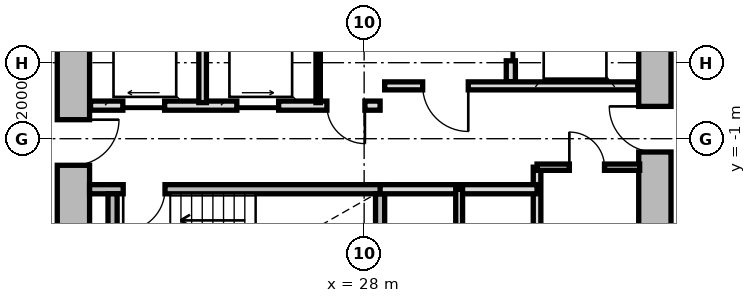
"""IFC4 building model, lengths in metres.
Left out: names, types, materials, properties, quantities, classifications, styles, units other than length and angle.
Written with IfcOpenShell. Run it as: python <this file> out.ifc"""

import sys

from ifc_helpers import new_model, si_unit, direction, frame, frame_2d, origin, place, context, subcontext, project, spatial, rectangle, extrude, source, transform, mapped, element, fill, save


model = new_model("IFC4")
c1 = context("Model", 3, precision=1e-05, world=origin(), true_north=direction((0.0, 1.0)))
c2 = subcontext(c1, "Body", "Model", "MODEL_VIEW")
j1 = project(units=[si_unit("LENGTHUNIT", "METRE"), si_unit("PLANEANGLEUNIT", "RADIAN")], contexts=[c1])
p1 = place(None, origin())
s1 = spatial("IfcSite", under=j1, at=p1, CompositionType="ELEMENT")
p2 = place(p1, origin())
s2 = spatial("IfcBuilding", under=s1, at=p2, CompositionType="ELEMENT")
p3 = place(p2, frame((0.0, 0.0, 64.3)))
s3 = spatial("IfcBuildingStorey", under=s2, at=p3, CompositionType="ELEMENT", Elevation=64.3)
m1 = source(origin(), c2, "Body", "SweptSolid", [
    extrude(rectangle(XDim=11.0, YDim=0.85, at=frame_2d((5.5, 0.0))), origin(), (0.0, 0.0, 1.0), 2.79),
])
p4 = place(p3, frame((20.35, -5.5, 0.0), z_axis=(0.0, 0.0, 1.0), x_axis=(0.0, 1.0, 0.0)))
e1 = element("IfcWall", 1, at=p4, inside=s3, PredefinedType="SHEAR", context=c2, shape_type="MappedRepresentation", body=[
    mapped(m1, transform((0.0, 0.0, 0.0), x_axis=(1.0, 0.0, 0.0), y_axis=(0.0, 1.0, 0.0), z_axis=(0.0, 0.0, 1.0), scale=1.0)),
])
p5 = place(p4, frame((3.8, 0.0, 0.0)))
e2 = element("IfcOpeningElement", 2, at=p5, cuts=e1, PredefinedType="OPENING", context=c2, shape_type="SweptSolid", body=[
    extrude(rectangle(XDim=1.2, YDim=2.15, at=frame_2d((0.6, 1.075))), frame((0.0, 0.435, 0.0), z_axis=(0.0, -1.0, 0.0), x_axis=(1.0, 0.0, 0.0)), (0.0, 0.0, 1.0), 0.87),
])
p6 = place(p3, frame((35.65, 5.5, 0.0), z_axis=(0.0, 0.0, 1.0), x_axis=(0.0, -1.0, 0.0)))
e3 = element("IfcWall", 3, at=p6, inside=s3, PredefinedType="SHEAR", context=c2, shape_type="MappedRepresentation", body=[
    mapped(m1, transform((0.0, 0.0, 0.0), x_axis=(1.0, 0.0, 0.0), y_axis=(0.0, 1.0, 0.0), z_axis=(0.0, 0.0, 1.0), scale=1.0)),
])
p7 = place(p6, frame((5.65, 0.0, 0.0)))
e4 = element("IfcOpeningElement", 4, at=p7, cuts=e3, PredefinedType="OPENING", context=c2, shape_type="SweptSolid", body=[
    extrude(rectangle(XDim=1.2, YDim=2.15, at=frame_2d((0.6, 1.075))), frame((0.0, 0.435, 0.0), z_axis=(0.0, -1.0, 0.0), x_axis=(1.0, 0.0, 0.0)), (0.0, 0.0, 1.0), 0.87),
])
m2 = source(origin(), c2, "Body", "SweptSolid", [
    extrude(rectangle(XDim=7.765, YDim=0.24, at=frame_2d((3.883, 0.0))), origin(), (0.0, 0.0, 1.0), 2.79),
])
p8 = place(p3, frame((20.775, -2.33, 0.0), z_axis=(0.0, 0.0, 1.0), x_axis=(1.0, 0.0, 0.0)))
e5 = element("IfcWall", 5, at=p8, inside=s3, PredefinedType="PARTITIONING", context=c2, shape_type="MappedRepresentation", body=[
    mapped(m2, transform((0.0, 0.0, 0.0), x_axis=(1.0, 0.0, 0.0), y_axis=(0.0, 1.0, 0.0), z_axis=(0.0, 0.0, 1.0), scale=1.0)),
])
p9 = place(p8, frame((0.885, 0.0, 0.0)))
e6 = element("IfcOpeningElement", 6, at=p9, cuts=e5, PredefinedType="OPENING", context=c2, shape_type="SweptSolid", body=[
    extrude(rectangle(XDim=1.1, YDim=2.15, at=frame_2d((0.55, 1.075))), frame((0.0, 0.13, 0.0), z_axis=(0.0, -1.0, 0.0), x_axis=(1.0, 0.0, 0.0)), (0.0, 0.0, 1.0), 0.26),
])
m3 = source(origin(), c2, "Body", "SweptSolid", [
    extrude(rectangle(XDim=3.075, YDim=0.24, at=frame_2d((1.538, 0.0))), origin(), (0.0, 0.0, 1.0), 2.79),
])
for number, where, z_axis, x_axis in (
    (7, (21.38, -5.525, 0.0), (0.0, 0.0, 1.0), (0.0, 1.0, 0.0)),
    (8, (28.42, -5.525, 0.0), (0.0, 0.0, 1.0), (0.0, 1.0, 0.0)),
):
    element("IfcWall", number, at=place(p3, frame(where, z_axis=z_axis, x_axis=x_axis)), inside=s3, PredefinedType="PARTITIONING", context=c2, shape_type="MappedRepresentation", body=[
        mapped(m3, transform((0.0, 0.0, 0.0), x_axis=(1.0, 0.0, 0.0), y_axis=(0.0, 1.0, 0.0), z_axis=(0.0, 0.0, 1.0), scale=1.0)),
    ])
m4 = source(origin(), c2, "Body", "SweptSolid", [
    extrude(rectangle(XDim=5.0, YDim=0.24, at=frame_2d((2.5, 0.0))), origin(), (0.0, 0.0, 1.0), 2.775),
])
p10 = place(p3, frame((31.86, 0.5, 0.0), z_axis=(0.0, 0.0, 1.0), x_axis=(0.0, 1.0, 0.0)))
e9 = element("IfcWall", 9, at=p10, inside=s3, PredefinedType="PARTITIONING", context=c2, shape_type="MappedRepresentation", body=[
    mapped(m4, transform((0.0, 0.0, 0.0), x_axis=(1.0, 0.0, 0.0), y_axis=(0.0, 1.0, 0.0), z_axis=(0.0, 0.0, 1.0), scale=1.0)),
])
p11 = place(p10, frame((3.05, 0.0, 0.0)))
e10 = element("IfcOpeningElement", 10, at=p11, cuts=e9, PredefinedType="OPENING", context=c2, shape_type="SweptSolid", body=[
    extrude(rectangle(XDim=1.3, YDim=2.2, at=frame_2d((0.65, 1.1))), frame((0.0, 0.13, 0.0), z_axis=(0.0, -1.0, 0.0), x_axis=(1.0, 0.0, 0.0)), (0.0, 0.0, 1.0), 0.26),
])
p12 = place(p10, frame((0.55, 0.0, 0.0)))
e11 = element("IfcOpeningElement", 11, at=p12, cuts=e9, PredefinedType="OPENING", context=c2, shape_type="SweptSolid", body=[
    extrude(rectangle(XDim=1.3, YDim=2.2, at=frame_2d((0.65, 1.1))), frame((0.0, 0.13, 0.0), z_axis=(0.0, -1.0, 0.0), x_axis=(1.0, 0.0, 0.0)), (0.0, 0.0, 1.0), 0.26),
])
m5 = source(origin(), c2, "Body", "SweptSolid", [
    extrude(rectangle(XDim=6.66, YDim=0.21, at=frame_2d((3.33, 0.0))), origin(), (0.0, 0.0, 1.0), 2.775),
])
p13 = place(p3, frame((28.54, 0.39, 0.0), z_axis=(0.0, 0.0, 1.0), x_axis=(1.0, 0.0, 0.0)))
e12 = element("IfcWall", 12, at=p13, inside=s3, PredefinedType="PARTITIONING", context=c2, shape_type="MappedRepresentation", body=[
    mapped(m5, transform((0.0, 0.0, 0.0), x_axis=(1.0, 0.0, 0.0), y_axis=(0.0, 1.0, 0.0), z_axis=(0.0, 0.0, 1.0), scale=1.0)),
])
p14 = place(p13, frame((1.0, 0.0, 0.0)))
e13 = element("IfcOpeningElement", 13, at=p14, cuts=e12, PredefinedType="OPENING", context=c2, shape_type="SweptSolid", body=[
    extrude(rectangle(XDim=1.2, YDim=2.15, at=frame_2d((0.6, 1.075))), frame((0.0, 0.115, 0.0), z_axis=(0.0, -1.0, 0.0), x_axis=(1.0, 0.0, 0.0)), (0.0, 0.0, 1.0), 0.23),
])
m6 = source(origin(), c2, "Body", "SweptSolid", [
    extrude(rectangle(XDim=7.62, YDim=0.24, at=frame_2d((3.81, 0.0))), origin(), (0.0, 0.0, 1.0), 2.775),
])
p15 = place(p3, frame((20.8, -0.13, 0.0), z_axis=(0.0, 0.0, 1.0), x_axis=(1.0, 0.0, 0.0)))
e14 = element("IfcWall", 14, at=p15, inside=s3, PredefinedType="PARTITIONING", context=c2, shape_type="MappedRepresentation", body=[
    mapped(m6, transform((0.0, 0.0, 0.0), x_axis=(1.0, 0.0, 0.0), y_axis=(0.0, 1.0, 0.0), z_axis=(0.0, 0.0, 1.0), scale=1.0)),
])
p16 = place(p15, frame((6.22, 0.0, 0.0)))
e15 = element("IfcOpeningElement", 15, at=p16, cuts=e14, PredefinedType="OPENING", context=c2, shape_type="SweptSolid", body=[
    extrude(rectangle(XDim=1.0, YDim=2.1, at=frame_2d((0.5, 1.05))), frame((0.0, 0.13, 0.0), z_axis=(0.0, -1.0, 0.0), x_axis=(1.0, 0.0, 0.0)), (0.0, 0.0, 1.0), 0.26),
])
p17 = place(p15, frame((0.85, 0.0, 0.0)))
e16 = element("IfcOpeningElement", 16, at=p17, cuts=e14, PredefinedType="OPENING", context=c2, shape_type="SweptSolid", body=[
    extrude(rectangle(XDim=1.1, YDim=2.2, at=frame_2d((0.55, 1.1))), frame((0.0, 0.13, 0.0), z_axis=(0.0, -1.0, 0.0), x_axis=(1.0, 0.0, 0.0)), (0.0, 0.0, 1.0), 0.26),
])
p18 = place(p15, frame((3.85, 0.0, 0.0)))
e17 = element("IfcOpeningElement", 17, at=p18, cuts=e14, PredefinedType="OPENING", context=c2, shape_type="SweptSolid", body=[
    extrude(rectangle(XDim=1.1, YDim=2.2, at=frame_2d((0.55, 1.1))), frame((0.0, 0.13, 0.0), z_axis=(0.0, -1.0, 0.0), x_axis=(1.0, 0.0, 0.0)), (0.0, 0.0, 1.0), 0.26),
])
m7 = source(origin(), c2, "Body", "SweptSolid", [
    extrude(rectangle(XDim=2.33, YDim=0.115, at=frame_2d((1.165, 0.0))), origin(), (0.0, 0.0, 1.0), 2.775),
])
p19 = place(p3, frame((26.79, -0.05, 0.0), z_axis=(0.0, 0.0, 1.0), x_axis=(0.0, 1.0, 0.0)))
e18 = element("IfcWall", 18, at=p19, inside=s3, PredefinedType="PARTITIONING", context=c2, shape_type="MappedRepresentation", body=[
    mapped(m7, transform((0.0, 0.0, 0.0), x_axis=(1.0, 0.0, 0.0), y_axis=(0.0, 1.0, 0.0), z_axis=(0.0, 0.0, 1.0), scale=1.0)),
])
m8 = source(origin(), c2, "Body", "SweptSolid", [
    extrude(rectangle(XDim=2.33, YDim=0.2, at=frame_2d((1.165, 0.0))), origin(), (0.0, 0.0, 1.0), 2.775),
])
p20 = place(p3, frame((23.75, -0.05, 0.0), z_axis=(0.0, 0.0, 1.0), x_axis=(0.0, 1.0, 0.0)))
e19 = element("IfcWall", 19, at=p20, inside=s3, PredefinedType="PARTITIONING", context=c2, shape_type="MappedRepresentation", body=[
    mapped(m8, transform((0.0, 0.0, 0.0), x_axis=(1.0, 0.0, 0.0), y_axis=(0.0, 1.0, 0.0), z_axis=(0.0, 0.0, 1.0), scale=1.0)),
])
m9 = source(origin(), c2, "Body", "SweptSolid", [
    extrude(rectangle(XDim=3.8, YDim=0.2, at=frame_2d((1.9, 0.0))), origin(), (0.0, 0.0, 1.0), 2.775),
])
p21 = place(p3, frame((32.55, -5.55, 0.0), z_axis=(0.0, 0.0, 1.0), x_axis=(0.0, 1.0, 0.0)))
e20 = element("IfcWall", 20, at=p21, inside=s3, PredefinedType="PARTITIONING", context=c2, shape_type="MappedRepresentation", body=[
    mapped(m9, transform((0.0, 0.0, 0.0), x_axis=(1.0, 0.0, 0.0), y_axis=(0.0, 1.0, 0.0), z_axis=(0.0, 0.0, 1.0), scale=1.0)),
])
m10 = source(origin(), c2, "Body", "SweptSolid", [
    extrude(rectangle(XDim=4.13, YDim=0.24, at=frame_2d((2.065, 0.0))), origin(), (0.0, 0.0, 1.0), 2.775),
])
p22 = place(p3, frame((28.42, -2.33, 0.0), z_axis=(0.0, 0.0, 1.0), x_axis=(1.0, 0.0, 0.0)))
e21 = element("IfcWall", 21, at=p22, inside=s3, PredefinedType="PARTITIONING", context=c2, shape_type="MappedRepresentation", body=[
    mapped(m10, transform((0.0, 0.0, 0.0), x_axis=(1.0, 0.0, 0.0), y_axis=(0.0, 1.0, 0.0), z_axis=(0.0, 0.0, 1.0), scale=1.0)),
])
m11 = source(origin(), c2, "Body", "SweptSolid", [
    extrude(rectangle(XDim=3.22, YDim=0.18, at=frame_2d((1.61, 0.0))), origin(), (0.0, 0.0, 1.0), 2.775),
])
p23 = place(p3, frame((30.5, -5.55, 0.0), z_axis=(0.0, 0.0, 1.0), x_axis=(0.0, 1.0, 0.0)))
e22 = element("IfcWall", 22, at=p23, inside=s3, PredefinedType="PARTITIONING", context=c2, shape_type="MappedRepresentation", body=[
    mapped(m11, transform((0.0, 0.0, 0.0), x_axis=(1.0, 0.0, 0.0), y_axis=(0.0, 1.0, 0.0), z_axis=(0.0, 0.0, 1.0), scale=1.0)),
])
m12 = source(origin(), c2, "Body", "SweptSolid", [
    extrude(rectangle(XDim=2.7, YDim=0.165, at=frame_2d((1.35, 0.0))), origin(), (0.0, 0.0, 1.0), 2.775),
])
p24 = place(p3, frame((32.55, -1.75, 0.0), z_axis=(0.0, 0.0, 1.0), x_axis=(1.0, 0.0, 0.0)))
e23 = element("IfcWall", 23, at=p24, inside=s3, PredefinedType="PARTITIONING", context=c2, shape_type="MappedRepresentation", body=[
    mapped(m12, transform((0.0, 0.0, 0.0), x_axis=(1.0, 0.0, 0.0), y_axis=(0.0, 1.0, 0.0), z_axis=(0.0, 0.0, 1.0), scale=1.0)),
])
p25 = place(p24, frame((0.85, 0.0, 0.0)))
e24 = element("IfcOpeningElement", 24, at=p25, cuts=e23, PredefinedType="OPENING", context=c2, shape_type="SweptSolid", body=[
    extrude(rectangle(XDim=0.925, YDim=2.1, at=frame_2d((0.462, 1.05))), frame((0.0, 0.093, 0.0), z_axis=(0.0, -1.0, 0.0), x_axis=(1.0, 0.0, 0.0)), (0.0, 0.0, 1.0), 0.185),
])
m13 = source(origin(), c2, "Body", "SweptSolid", [
    extrude(rectangle(XDim=1.1, YDim=2.15, at=frame_2d((0.55, 1.075))), frame((0.0, 0.025, 0.0), z_axis=(0.0, -1.0, 0.0), x_axis=(1.0, 0.0, 0.0)), (0.0, 0.0, 1.0), 0.05),
])
p26 = place(p9, frame((1.1, 0.0, 0.0), z_axis=(0.0, 0.0, 1.0), x_axis=(-1.0, 0.0, 0.0)))
e25 = element("IfcDoor", 25, at=p26, inside=s3, OperationType="SINGLE_SWING_RIGHT", PredefinedType="DOOR", context=c2, shape_type="MappedRepresentation", body=[
    mapped(m13, transform((0.0, 0.0, 0.0), x_axis=(1.0, 0.0, 0.0), y_axis=(0.0, 1.0, 0.0), z_axis=(0.0, 0.0, 1.0), scale=1.0)),
])
fill(e6, e25)
m14 = source(origin(), c2, "Body", "SweptSolid", [
    extrude(rectangle(XDim=1.3, YDim=2.2, at=frame_2d((0.65, 1.1))), frame((0.0, 0.025, 0.0), z_axis=(0.0, -1.0, 0.0), x_axis=(1.0, 0.0, 0.0)), (0.0, 0.0, 1.0), 0.05),
])
p27 = place(p12, origin())
e26 = element("IfcDoor", 26, at=p27, inside=s3, OperationType="SLIDING_TO_RIGHT", PredefinedType="DOOR", context=c2, shape_type="MappedRepresentation", body=[
    mapped(m14, transform((0.0, 0.0, 0.0), x_axis=(1.0, 0.0, 0.0), y_axis=(0.0, 1.0, 0.0), z_axis=(0.0, 0.0, 1.0), scale=1.0)),
])
fill(e11, e26)
m15 = source(origin(), c2, "Body", "SweptSolid", [
    extrude(rectangle(XDim=1.2, YDim=2.15, at=frame_2d((0.6, 1.075))), frame((0.0, 0.025, 0.0), z_axis=(0.0, -1.0, 0.0), x_axis=(1.0, 0.0, 0.0)), (0.0, 0.0, 1.0), 0.05),
])
p28 = place(p14, frame((1.2, 0.0, 0.0), z_axis=(0.0, 0.0, 1.0), x_axis=(-1.0, 0.0, 0.0)))
e27 = element("IfcDoor", 27, at=p28, inside=s3, OperationType="SINGLE_SWING_LEFT", PredefinedType="DOOR", context=c2, shape_type="MappedRepresentation", body=[
    mapped(m15, transform((0.0, 0.0, 0.0), x_axis=(1.0, 0.0, 0.0), y_axis=(0.0, 1.0, 0.0), z_axis=(0.0, 0.0, 1.0), scale=1.0)),
])
fill(e13, e27)
p29 = place(p5, frame((1.2, 0.0, 0.0), z_axis=(0.0, 0.0, 1.0), x_axis=(-1.0, 0.0, 0.0)))
e28 = element("IfcDoor", 28, at=p29, inside=s3, OperationType="SINGLE_SWING_LEFT", PredefinedType="DOOR", context=c2, shape_type="MappedRepresentation", body=[
    mapped(m15, transform((0.0, 0.0, 0.0), x_axis=(1.0, 0.0, 0.0), y_axis=(0.0, 1.0, 0.0), z_axis=(0.0, 0.0, 1.0), scale=1.0)),
])
fill(e2, e28)
p30 = place(p7, frame((1.2, 0.0, 0.0), z_axis=(0.0, 0.0, 1.0), x_axis=(-1.0, 0.0, 0.0)))
e29 = element("IfcDoor", 29, at=p30, inside=s3, OperationType="SINGLE_SWING_RIGHT", PredefinedType="DOOR", context=c2, shape_type="MappedRepresentation", body=[
    mapped(m15, transform((0.0, 0.0, 0.0), x_axis=(1.0, 0.0, 0.0), y_axis=(0.0, 1.0, 0.0), z_axis=(0.0, 0.0, 1.0), scale=1.0)),
])
fill(e4, e29)
m16 = source(origin(), c2, "Body", "SweptSolid", [
    extrude(rectangle(XDim=1.0, YDim=2.1, at=frame_2d((0.5, 1.05))), frame((0.0, 0.025, 0.0), z_axis=(0.0, -1.0, 0.0), x_axis=(1.0, 0.0, 0.0)), (0.0, 0.0, 1.0), 0.05),
])
p31 = place(p16, frame((1.0, 0.0, 0.0), z_axis=(0.0, 0.0, 1.0), x_axis=(-1.0, 0.0, 0.0)))
e30 = element("IfcDoor", 30, at=p31, inside=s3, OperationType="SINGLE_SWING_LEFT", PredefinedType="DOOR", context=c2, shape_type="MappedRepresentation", body=[
    mapped(m16, transform((0.0, 0.0, 0.0), x_axis=(1.0, 0.0, 0.0), y_axis=(0.0, 1.0, 0.0), z_axis=(0.0, 0.0, 1.0), scale=1.0)),
])
fill(e15, e30)
m17 = source(origin(), c2, "Body", "SweptSolid", [
    extrude(rectangle(XDim=1.1, YDim=2.2, at=frame_2d((0.55, 1.1))), frame((0.0, 0.025, 0.0), z_axis=(0.0, -1.0, 0.0), x_axis=(1.0, 0.0, 0.0)), (0.0, 0.0, 1.0), 0.05),
])
p32 = place(p17, origin())
e31 = element("IfcDoor", 31, at=p32, inside=s3, OperationType="SLIDING_TO_LEFT", PredefinedType="DOOR", context=c2, shape_type="MappedRepresentation", body=[
    mapped(m17, transform((0.0, 0.0, 0.0), x_axis=(1.0, 0.0, 0.0), y_axis=(0.0, 1.0, 0.0), z_axis=(0.0, 0.0, 1.0), scale=1.0)),
])
fill(e16, e31)
p33 = place(p18, origin())
e32 = element("IfcDoor", 32, at=p33, inside=s3, OperationType="SLIDING_TO_RIGHT", PredefinedType="DOOR", context=c2, shape_type="MappedRepresentation", body=[
    mapped(m17, transform((0.0, 0.0, 0.0), x_axis=(1.0, 0.0, 0.0), y_axis=(0.0, 1.0, 0.0), z_axis=(0.0, 0.0, 1.0), scale=1.0)),
])
fill(e17, e32)
m18 = source(origin(), c2, "Body", "SweptSolid", [
    extrude(rectangle(XDim=0.925, YDim=2.1, at=frame_2d((0.462, 1.05))), frame((0.0, 0.025, 0.0), z_axis=(0.0, -1.0, 0.0), x_axis=(1.0, 0.0, 0.0)), (0.0, 0.0, 1.0), 0.05),
])
p34 = place(p25, origin())
e33 = element("IfcDoor", 33, at=p34, inside=s3, OperationType="SINGLE_SWING_LEFT", PredefinedType="DOOR", context=c2, shape_type="MappedRepresentation", body=[
    mapped(m18, transform((0.0, 0.0, 0.0), x_axis=(1.0, 0.0, 0.0), y_axis=(0.0, 1.0, 0.0), z_axis=(0.0, 0.0, 1.0), scale=1.0)),
])
fill(e24, e33)
save(model, sys.argv[1])
